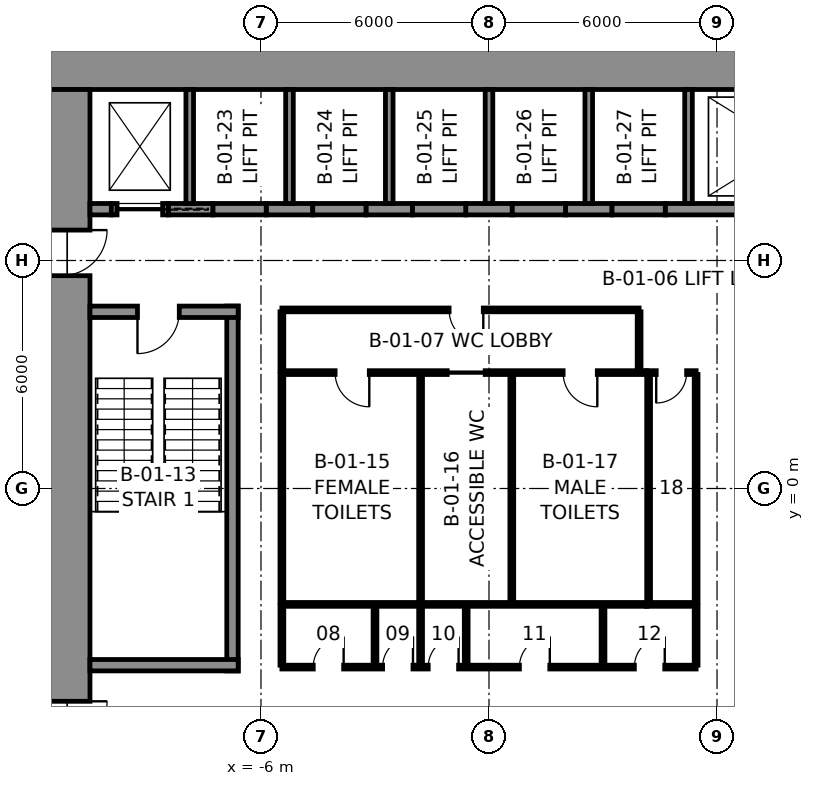
"""IFC4 building model, lengths in metres.
Left out: names, types, materials, properties, quantities, classifications, styles, units other than length and angle.
Written with IfcOpenShell. Run it as: python <this file> out.ifc"""

import sys

from ifc_helpers import new_model, si_unit, direction, frame, frame_2d, origin, place, context, subcontext, project, spatial, rectangle, extrude, element, fill, save


model = new_model("IFC4")
c1 = context("Model", 3, precision=1e-05, world=origin(), true_north=direction((0.0, 1.0)))
c2 = subcontext(c1, "Body", "Model", "MODEL_VIEW")
j1 = project(units=[si_unit("LENGTHUNIT", "METRE"), si_unit("PLANEANGLEUNIT", "RADIAN")], contexts=[c1])
p1 = place(None, origin())
s1 = spatial("IfcSite", under=j1, at=p1, CompositionType="ELEMENT")
p2 = place(p1, origin())
s2 = spatial("IfcBuilding", under=s1, at=p2, CompositionType="ELEMENT")
p3 = place(p2, frame((0.0, 0.0, -5.0)))
s3 = spatial("IfcBuildingStorey", under=s2, at=p3, CompositionType="ELEMENT", Elevation=-5.0)
p4 = place(p3, frame((-12.0, 11.25, -0.3), z_axis=(0.0, 0.0, 1.0), x_axis=(1.0, 0.0, 0.0)))
e1 = element("IfcWall", 1, at=p4, inside=s3, PredefinedType="SHEAR", context=c2, shape_type="SweptSolid", body=[
    extrude(rectangle(XDim=24.0, YDim=1.5, at=frame_2d((12.0, 0.0))), origin(), (0.0, 0.0, 1.0), 5.3),
])
p5 = place(p3, frame((-11.25, -10.5, -0.3), z_axis=(0.0, 0.0, 1.0), x_axis=(0.0, 1.0, 0.0)))
e2 = element("IfcWall", 2, at=p5, inside=s3, PredefinedType="SHEAR", context=c2, shape_type="SweptSolid", body=[
    extrude(rectangle(XDim=21.0, YDim=1.5, at=frame_2d((10.5, 0.0))), origin(), (0.0, 0.0, 1.0), 5.3),
])
p6 = place(p5, frame((16.1, 0.0, 0.3)))
e3 = element("IfcOpeningElement", 3, at=p6, cuts=e2, PredefinedType="OPENING", context=c2, shape_type="SweptSolid", body=[
    extrude(rectangle(XDim=1.2, YDim=2.3, at=frame_2d((0.6, 1.15))), frame((0.0, 0.76, 0.0), z_axis=(0.0, -1.0, 0.0), x_axis=(1.0, 0.0, 0.0)), (0.0, 0.0, 1.0), 1.52),
])
p7 = place(p5, frame((3.7, 0.0, 0.3)))
e4 = element("IfcOpeningElement", 4, at=p7, cuts=e2, PredefinedType="OPENING", context=c2, shape_type="SweptSolid", body=[
    extrude(rectangle(XDim=1.2, YDim=2.3, at=frame_2d((0.6, 1.15))), frame((0.0, 0.76, 0.0), z_axis=(0.0, -1.0, 0.0), x_axis=(1.0, 0.0, 0.0)), (0.0, 0.0, 1.0), 1.52),
])
p8 = place(p3, frame((-10.5, 7.35, -0.3), z_axis=(0.0, 0.0, 1.0), x_axis=(1.0, 0.0, 0.0)))
e5 = element("IfcWall", 5, at=p8, inside=s3, PredefinedType="SHEAR", context=c2, shape_type="SweptSolid", body=[
    extrude(rectangle(XDim=0.562, YDim=0.3, at=frame_2d((0.281, 0.0))), origin(), (0.0, 0.0, 1.0), 5.3),
])
p9 = place(p3, frame((-8.438, 7.35, -0.3), z_axis=(0.0, 0.0, 1.0), x_axis=(1.0, 0.0, 0.0)))
e6 = element("IfcWall", 6, at=p9, inside=s3, PredefinedType="SHEAR", context=c2, shape_type="SweptSolid", body=[
    extrude(rectangle(XDim=1.175, YDim=0.3, at=frame_2d((0.587, 0.0))), origin(), (0.0, 0.0, 1.0), 5.3),
])
for number, where, z_axis, x_axis in (
    (7, (-5.863, 7.35, -0.3), (0.0, 0.0, 1.0), (1.0, 0.0, 0.0)),
    (8, (-3.238, 7.35, -0.3), (0.0, 0.0, 1.0), (1.0, 0.0, 0.0)),
    (9, (-0.613, 7.35, -0.3), (0.0, 0.0, 1.0), (1.0, 0.0, 0.0)),
    (10, (2.012, 7.35, -0.3), (0.0, 0.0, 1.0), (1.0, 0.0, 0.0)),
):
    element("IfcWall", number, at=place(p3, frame(where, z_axis=z_axis, x_axis=x_axis)), inside=s3, PredefinedType="SHEAR", context=c2, shape_type="SweptSolid", body=[
        extrude(rectangle(XDim=1.225, YDim=0.3, at=frame_2d((0.613, 0.0))), origin(), (0.0, 0.0, 1.0), 5.3),
    ])
p10 = place(p3, frame((4.637, 7.35, -0.3), z_axis=(0.0, 0.0, 1.0), x_axis=(1.0, 0.0, 0.0)))
e11 = element("IfcWall", 11, at=p10, inside=s3, PredefinedType="SHEAR", context=c2, shape_type="SweptSolid", body=[
    extrude(rectangle(XDim=1.887, YDim=0.3, at=frame_2d((0.944, 0.0))), origin(), (0.0, 0.0, 1.0), 5.3),
])
p11 = place(p3, frame((-9.938, 7.35, -0.3), z_axis=(0.0, 0.0, 1.0), x_axis=(1.0, 0.0, 0.0)))
e12 = element("IfcWall", 12, at=p11, inside=s3, PredefinedType="PARTITIONING", context=c2, shape_type="SweptSolid", body=[
    extrude(rectangle(XDim=1.5, YDim=0.3, at=frame_2d((0.75, 0.0))), origin(), (0.0, 0.0, 1.0), 5.3),
])
p12 = place(p11, frame((0.15, 0.0, 0.3)))
e13 = element("IfcOpeningElement", 13, at=p12, cuts=e12, PredefinedType="OPENING", context=c2, shape_type="SweptSolid", body=[
    extrude(rectangle(XDim=1.2, YDim=2.3, at=frame_2d((0.6, 1.15))), frame((0.0, 0.16, 0.0), z_axis=(0.0, -1.0, 0.0), x_axis=(1.0, 0.0, 0.0)), (0.0, 0.0, 1.0), 0.32),
])
for number, where, z_axis, x_axis in (
    (14, (-7.262, 7.35, -0.3), (0.0, 0.0, 1.0), (1.0, 0.0, 0.0)),
    (15, (-4.637, 7.35, -0.3), (0.0, 0.0, 1.0), (1.0, 0.0, 0.0)),
    (16, (-2.012, 7.35, -0.3), (0.0, 0.0, 1.0), (1.0, 0.0, 0.0)),
    (17, (0.613, 7.35, -0.3), (0.0, 0.0, 1.0), (1.0, 0.0, 0.0)),
    (18, (3.238, 7.35, -0.3), (0.0, 0.0, 1.0), (1.0, 0.0, 0.0)),
):
    element("IfcWall", number, at=place(p3, frame(where, z_axis=z_axis, x_axis=x_axis)), inside=s3, PredefinedType="PARTITIONING", context=c2, shape_type="SweptSolid", body=[
        extrude(rectangle(XDim=1.4, YDim=0.3, at=frame_2d((0.7, 0.0))), origin(), (0.0, 0.0, 1.0), 5.3),
    ])
for number, where, z_axis, x_axis in (
    (19, (-7.875, 7.5, -0.3), (0.0, 0.0, 1.0), (0.0, 1.0, 0.0)),
    (20, (-5.25, 7.5, -0.3), (0.0, 0.0, 1.0), (0.0, 1.0, 0.0)),
    (21, (-2.625, 7.5, -0.3), (0.0, 0.0, 1.0), (0.0, 1.0, 0.0)),
    (22, (0.0, 7.5, -0.3), (0.0, 0.0, 1.0), (0.0, 1.0, 0.0)),
    (23, (2.625, 7.5, -0.3), (0.0, 0.0, 1.0), (0.0, 1.0, 0.0)),
    (24, (5.25, 7.5, -0.3), (0.0, 0.0, 1.0), (0.0, 1.0, 0.0)),
):
    element("IfcWall", number, at=place(p3, frame(where, z_axis=z_axis, x_axis=x_axis)), inside=s3, PredefinedType="PARTITIONING", context=c2, shape_type="SweptSolid", body=[
        extrude(rectangle(XDim=3.0, YDim=0.2, at=frame_2d((1.5, 0.0))), origin(), (0.0, 0.0, 1.0), 5.3),
    ])
p13 = place(p3, frame((-6.75, -4.8, 0.0), z_axis=(0.0, 0.0, 1.0), x_axis=(0.0, 1.0, 0.0)))
e25 = element("IfcWall", 25, at=p13, inside=s3, PredefinedType="SOLIDWALL", context=c2, shape_type="SweptSolid", body=[
    extrude(rectangle(XDim=9.6, YDim=0.3, at=frame_2d((4.8, 0.0))), origin(), (0.0, 0.0, 1.0), 4.75),
])
p14 = place(p3, frame((-10.5, 4.65, 0.0), z_axis=(0.0, 0.0, 1.0), x_axis=(1.0, 0.0, 0.0)))
e26 = element("IfcWall", 26, at=p14, inside=s3, PredefinedType="SOLIDWALL", context=c2, shape_type="SweptSolid", body=[
    extrude(rectangle(XDim=3.9, YDim=0.3, at=frame_2d((1.95, 0.0))), origin(), (0.0, 0.0, 1.0), 4.75),
])
p15 = place(p14, frame((1.25, 0.0, 0.0)))
e27 = element("IfcOpeningElement", 27, at=p15, cuts=e26, PredefinedType="OPENING", context=c2, shape_type="SweptSolid", body=[
    extrude(rectangle(XDim=1.1, YDim=2.3, at=frame_2d((0.55, 1.15))), frame((0.0, 0.16, 0.0), z_axis=(0.0, -1.0, 0.0), x_axis=(1.0, 0.0, 0.0)), (0.0, 0.0, 1.0), 0.32),
])
p16 = place(p3, frame((-6.6, -4.65, 0.0), z_axis=(0.0, 0.0, 1.0), x_axis=(-1.0, 0.0, 0.0)))
e28 = element("IfcWall", 28, at=p16, inside=s3, PredefinedType="SOLIDWALL", context=c2, shape_type="SweptSolid", body=[
    extrude(rectangle(XDim=3.9, YDim=0.3, at=frame_2d((1.95, 0.0))), origin(), (0.0, 0.0, 1.0), 4.75),
])
p17 = place(p3, frame((-5.45, 3.05, 0.0), z_axis=(0.0, 0.0, 1.0), x_axis=(1.0, 0.0, 0.0)))
e29 = element("IfcWall", 29, at=p17, inside=s3, PredefinedType="PARTITIONING", context=c2, shape_type="SweptSolid", body=[
    extrude(rectangle(XDim=9.6, YDim=0.1, at=frame_2d((4.8, 0.0))), origin(), (0.0, 0.0, 1.0), 4.75),
])
p18 = place(p17, frame((1.4, 0.0, 0.0)))
e30 = element("IfcOpeningElement", 30, at=p18, cuts=e29, PredefinedType="OPENING", context=c2, shape_type="SweptSolid", body=[
    extrude(rectangle(XDim=0.9, YDim=2.3, at=frame_2d((0.45, 1.15))), frame((0.0, 0.06, 0.0), z_axis=(0.0, -1.0, 0.0), x_axis=(1.0, 0.0, 0.0)), (0.0, 0.0, 1.0), 0.12),
])
p19 = place(p17, frame((4.35, 0.0, 0.0)))
e31 = element("IfcOpeningElement", 31, at=p19, cuts=e29, PredefinedType="OPENING", context=c2, shape_type="SweptSolid", body=[
    extrude(rectangle(XDim=1.0, YDim=2.3, at=frame_2d((0.5, 1.15))), frame((0.0, 0.06, 0.0), z_axis=(0.0, -1.0, 0.0), x_axis=(1.0, 0.0, 0.0)), (0.0, 0.0, 1.0), 0.12),
])
p20 = place(p17, frame((7.4, 0.0, 0.0)))
e32 = element("IfcOpeningElement", 32, at=p20, cuts=e29, PredefinedType="OPENING", context=c2, shape_type="SweptSolid", body=[
    extrude(rectangle(XDim=0.9, YDim=2.3, at=frame_2d((0.45, 1.15))), frame((0.0, 0.06, 0.0), z_axis=(0.0, -1.0, 0.0), x_axis=(1.0, 0.0, 0.0)), (0.0, 0.0, 1.0), 0.12),
])
p21 = place(p3, frame((4.15, 3.05, 0.0), z_axis=(0.0, 0.0, 1.0), x_axis=(1.0, 0.0, 0.0)))
e33 = element("IfcWall", 33, at=p21, inside=s3, PredefinedType="PARTITIONING", context=c2, shape_type="SweptSolid", body=[
    extrude(rectangle(XDim=1.3, YDim=0.1, at=frame_2d((0.65, 0.0))), origin(), (0.0, 0.0, 1.0), 4.75),
])
p22 = place(p21, frame((0.25, 0.0, 0.0)))
e34 = element("IfcOpeningElement", 34, at=p22, cuts=e33, PredefinedType="OPENING", context=c2, shape_type="SweptSolid", body=[
    extrude(rectangle(XDim=0.8, YDim=2.3, at=frame_2d((0.4, 1.15))), frame((0.0, 0.06, 0.0), z_axis=(0.0, -1.0, 0.0), x_axis=(1.0, 0.0, 0.0)), (0.0, 0.0, 1.0), 0.12),
])
p23 = place(p3, frame((4.15, -3.05, 0.0), z_axis=(0.0, 0.0, 1.0), x_axis=(-1.0, 0.0, 0.0)))
e35 = element("IfcWall", 35, at=p23, inside=s3, PredefinedType="PARTITIONING", context=c2, shape_type="SweptSolid", body=[
    extrude(rectangle(XDim=9.6, YDim=0.1, at=frame_2d((4.8, 0.0))), origin(), (0.0, 0.0, 1.0), 4.75),
])
p24 = place(p3, frame((5.45, -3.05, 0.0), z_axis=(0.0, 0.0, 1.0), x_axis=(-1.0, 0.0, 0.0)))
e36 = element("IfcWall", 36, at=p24, inside=s3, PredefinedType="PARTITIONING", context=c2, shape_type="SweptSolid", body=[
    extrude(rectangle(XDim=1.3, YDim=0.1, at=frame_2d((0.65, 0.0))), origin(), (0.0, 0.0, 1.0), 4.75),
])
for number, where, z_axis, x_axis in (
    (37, (5.45, 3.0, 0.0), (0.0, 0.0, 1.0), (0.0, -1.0, 0.0)),
    (38, (-5.45, -3.0, 0.0), (0.0, 0.0, 1.0), (0.0, 1.0, 0.0)),
    (39, (-1.8, -3.0, 0.0), (0.0, 0.0, 1.0), (0.0, 1.0, 0.0)),
    (40, (0.6, -3.0, 0.0), (0.0, 0.0, 1.0), (0.0, 1.0, 0.0)),
    (41, (4.2, -3.0, 0.0), (0.0, 0.0, 1.0), (0.0, 1.0, 0.0)),
):
    element("IfcWall", number, at=place(p3, frame(where, z_axis=z_axis, x_axis=x_axis)), inside=s3, PredefinedType="PARTITIONING", context=c2, shape_type="SweptSolid", body=[
        extrude(rectangle(XDim=6.0, YDim=0.1, at=frame_2d((3.0, 0.0))), origin(), (0.0, 0.0, 1.0), 4.75),
    ])
p25 = place(p3, frame((-5.45, 4.7, 0.0), z_axis=(0.0, 0.0, 1.0), x_axis=(1.0, 0.0, 0.0)))
e42 = element("IfcWall", 42, at=p25, inside=s3, PredefinedType="PARTITIONING", context=c2, shape_type="SweptSolid", body=[
    extrude(rectangle(XDim=9.4, YDim=0.1, at=frame_2d((4.7, 0.0))), origin(), (0.0, 0.0, 1.0), 4.75),
])
p26 = place(p25, frame((4.4, 0.0, 0.0)))
e43 = element("IfcOpeningElement", 43, at=p26, cuts=e42, PredefinedType="OPENING", context=c2, shape_type="SweptSolid", body=[
    extrude(rectangle(XDim=0.9, YDim=2.3, at=frame_2d((0.45, 1.15))), frame((0.0, 0.06, 0.0), z_axis=(0.0, -1.0, 0.0), x_axis=(1.0, 0.0, 0.0)), (0.0, 0.0, 1.0), 0.12),
])
for number, where, z_axis, x_axis in (
    (44, (-5.45, 3.1, 0.0), (0.0, 0.0, 1.0), (0.0, 1.0, 0.0)),
    (45, (3.95, 3.1, 0.0), (0.0, 0.0, 1.0), (0.0, 1.0, 0.0)),
):
    element("IfcWall", number, at=place(p3, frame(where, z_axis=z_axis, x_axis=x_axis)), inside=s3, PredefinedType="PARTITIONING", context=c2, shape_type="SweptSolid", body=[
        extrude(rectangle(XDim=1.55, YDim=0.1, at=frame_2d((0.775, 0.0))), origin(), (0.0, 0.0, 1.0), 4.75),
    ])
p27 = place(p3, frame((5.45, -4.7, 0.0), z_axis=(0.0, 0.0, 1.0), x_axis=(-1.0, 0.0, 0.0)))
e46 = element("IfcWall", 46, at=p27, inside=s3, PredefinedType="PARTITIONING", context=c2, shape_type="SweptSolid", body=[
    extrude(rectangle(XDim=10.9, YDim=0.1, at=frame_2d((5.45, 0.0))), origin(), (0.0, 0.0, 1.0), 4.75),
])
p28 = place(p27, frame((9.275, 0.0, 0.0)))
e47 = element("IfcOpeningElement", 47, at=p28, cuts=e46, PredefinedType="OPENING", context=c2, shape_type="SweptSolid", body=[
    extrude(rectangle(XDim=0.8, YDim=2.3, at=frame_2d((0.4, 1.15))), frame((0.0, 0.06, 0.0), z_axis=(0.0, -1.0, 0.0), x_axis=(1.0, 0.0, 0.0)), (0.0, 0.0, 1.0), 0.12),
])
p29 = place(p27, frame((7.45, 0.0, 0.0)))
e48 = element("IfcOpeningElement", 48, at=p29, cuts=e46, PredefinedType="OPENING", context=c2, shape_type="SweptSolid", body=[
    extrude(rectangle(XDim=0.8, YDim=2.3, at=frame_2d((0.4, 1.15))), frame((0.0, 0.06, 0.0), z_axis=(0.0, -1.0, 0.0), x_axis=(1.0, 0.0, 0.0)), (0.0, 0.0, 1.0), 0.12),
])
p30 = place(p27, frame((6.25, 0.0, 0.0)))
e49 = element("IfcOpeningElement", 49, at=p30, cuts=e46, PredefinedType="OPENING", context=c2, shape_type="SweptSolid", body=[
    extrude(rectangle(XDim=0.8, YDim=2.3, at=frame_2d((0.4, 1.15))), frame((0.0, 0.06, 0.0), z_axis=(0.0, -1.0, 0.0), x_axis=(1.0, 0.0, 0.0)), (0.0, 0.0, 1.0), 0.12),
])
p31 = place(p27, frame((3.85, 0.0, 0.0)))
e50 = element("IfcOpeningElement", 50, at=p31, cuts=e46, PredefinedType="OPENING", context=c2, shape_type="SweptSolid", body=[
    extrude(rectangle(XDim=0.8, YDim=2.3, at=frame_2d((0.4, 1.15))), frame((0.0, 0.06, 0.0), z_axis=(0.0, -1.0, 0.0), x_axis=(1.0, 0.0, 0.0)), (0.0, 0.0, 1.0), 0.12),
])
p32 = place(p27, frame((0.825, 0.0, 0.0)))
e51 = element("IfcOpeningElement", 51, at=p32, cuts=e46, PredefinedType="OPENING", context=c2, shape_type="SweptSolid", body=[
    extrude(rectangle(XDim=0.8, YDim=2.3, at=frame_2d((0.4, 1.15))), frame((0.0, 0.06, 0.0), z_axis=(0.0, -1.0, 0.0), x_axis=(1.0, 0.0, 0.0)), (0.0, 0.0, 1.0), 0.12),
])
for number, where, z_axis, x_axis in (
    (52, (-5.45, -3.1, 0.0), (0.0, 0.0, 1.0), (0.0, -1.0, 0.0)),
    (53, (5.45, -3.1, 0.0), (0.0, 0.0, 1.0), (0.0, -1.0, 0.0)),
    (54, (-3.0, -3.1, 0.0), (0.0, 0.0, 1.0), (0.0, -1.0, 0.0)),
    (55, (-1.8, -3.1, 0.0), (0.0, 0.0, 1.0), (0.0, -1.0, 0.0)),
    (56, (-0.6, -3.1, 0.0), (0.0, 0.0, 1.0), (0.0, -1.0, 0.0)),
    (57, (3.0, -3.1, 0.0), (0.0, 0.0, 1.0), (0.0, -1.0, 0.0)),
):
    element("IfcWall", number, at=place(p3, frame(where, z_axis=z_axis, x_axis=x_axis)), inside=s3, PredefinedType="PARTITIONING", context=c2, shape_type="SweptSolid", body=[
        extrude(rectangle(XDim=1.55, YDim=0.1, at=frame_2d((0.775, 0.0))), origin(), (0.0, 0.0, 1.0), 4.75),
    ])
p33 = place(p15, frame((1.1, 0.0, 0.0), z_axis=(0.0, 0.0, 1.0), x_axis=(-1.0, 0.0, 0.0)))
e58 = element("IfcDoor", 58, at=p33, inside=s3, OperationType="SINGLE_SWING_RIGHT", PredefinedType="DOOR", context=c2, shape_type="SweptSolid", body=[
    extrude(rectangle(XDim=1.1, YDim=2.3, at=frame_2d((0.55, 1.15))), frame((0.0, 0.025, 0.0), z_axis=(0.0, -1.0, 0.0), x_axis=(1.0, 0.0, 0.0)), (0.0, 0.0, 1.0), 0.05),
])
fill(e27, e58)
p34 = place(p18, frame((0.9, 0.0, 0.0), z_axis=(0.0, 0.0, 1.0), x_axis=(-1.0, 0.0, 0.0)))
e59 = element("IfcDoor", 59, at=p34, inside=s3, OperationType="SINGLE_SWING_LEFT", PredefinedType="DOOR", context=c2, shape_type="SweptSolid", body=[
    extrude(rectangle(XDim=0.9, YDim=2.3, at=frame_2d((0.45, 1.15))), frame((0.0, 0.025, 0.0), z_axis=(0.0, -1.0, 0.0), x_axis=(1.0, 0.0, 0.0)), (0.0, 0.0, 1.0), 0.05),
])
fill(e30, e59)
p35 = place(p19, frame((1.0, 0.0, 0.0), z_axis=(0.0, 0.0, 1.0), x_axis=(-1.0, 0.0, 0.0)))
e60 = element("IfcDoor", 60, at=p35, inside=s3, OperationType="SLIDING_TO_LEFT", PredefinedType="DOOR", context=c2, shape_type="SweptSolid", body=[
    extrude(rectangle(XDim=1.0, YDim=2.3, at=frame_2d((0.5, 1.15))), frame((0.0, 0.025, 0.0), z_axis=(0.0, -1.0, 0.0), x_axis=(1.0, 0.0, 0.0)), (0.0, 0.0, 1.0), 0.05),
])
fill(e31, e60)
p36 = place(p20, frame((0.9, 0.0, 0.0), z_axis=(0.0, 0.0, 1.0), x_axis=(-1.0, 0.0, 0.0)))
e61 = element("IfcDoor", 61, at=p36, inside=s3, OperationType="SINGLE_SWING_LEFT", PredefinedType="DOOR", context=c2, shape_type="SweptSolid", body=[
    extrude(rectangle(XDim=0.9, YDim=2.3, at=frame_2d((0.45, 1.15))), frame((0.0, 0.025, 0.0), z_axis=(0.0, -1.0, 0.0), x_axis=(1.0, 0.0, 0.0)), (0.0, 0.0, 1.0), 0.05),
])
fill(e32, e61)
p37 = place(p22, frame((0.8, 0.0, 0.0), z_axis=(0.0, 0.0, 1.0), x_axis=(-1.0, 0.0, 0.0)))
e62 = element("IfcDoor", 62, at=p37, inside=s3, OperationType="SINGLE_SWING_RIGHT", PredefinedType="DOOR", context=c2, shape_type="SweptSolid", body=[
    extrude(rectangle(XDim=0.8, YDim=2.3, at=frame_2d((0.4, 1.15))), frame((0.0, 0.025, 0.0), z_axis=(0.0, -1.0, 0.0), x_axis=(1.0, 0.0, 0.0)), (0.0, 0.0, 1.0), 0.05),
])
fill(e34, e62)
p38 = place(p26, frame((0.9, 0.0, 0.0), z_axis=(0.0, 0.0, 1.0), x_axis=(-1.0, 0.0, 0.0)))
e63 = element("IfcDoor", 63, at=p38, inside=s3, OperationType="SINGLE_SWING_LEFT", PredefinedType="DOOR", context=c2, shape_type="SweptSolid", body=[
    extrude(rectangle(XDim=0.9, YDim=2.3, at=frame_2d((0.45, 1.15))), frame((0.0, 0.025, 0.0), z_axis=(0.0, -1.0, 0.0), x_axis=(1.0, 0.0, 0.0)), (0.0, 0.0, 1.0), 0.05),
])
fill(e43, e63)
p39 = place(p28, frame((0.8, 0.0, 0.0), z_axis=(0.0, 0.0, 1.0), x_axis=(-1.0, 0.0, 0.0)))
e64 = element("IfcDoor", 64, at=p39, inside=s3, OperationType="SINGLE_SWING_RIGHT", PredefinedType="DOOR", context=c2, shape_type="SweptSolid", body=[
    extrude(rectangle(XDim=0.8, YDim=2.3, at=frame_2d((0.4, 1.15))), frame((0.0, 0.025, 0.0), z_axis=(0.0, -1.0, 0.0), x_axis=(1.0, 0.0, 0.0)), (0.0, 0.0, 1.0), 0.05),
])
fill(e47, e64)
p40 = place(p29, frame((0.8, 0.0, 0.0), z_axis=(0.0, 0.0, 1.0), x_axis=(-1.0, 0.0, 0.0)))
e65 = element("IfcDoor", 65, at=p40, inside=s3, OperationType="SINGLE_SWING_RIGHT", PredefinedType="DOOR", context=c2, shape_type="SweptSolid", body=[
    extrude(rectangle(XDim=0.8, YDim=2.3, at=frame_2d((0.4, 1.15))), frame((0.0, 0.025, 0.0), z_axis=(0.0, -1.0, 0.0), x_axis=(1.0, 0.0, 0.0)), (0.0, 0.0, 1.0), 0.05),
])
fill(e48, e65)
p41 = place(p30, frame((0.8, 0.0, 0.0), z_axis=(0.0, 0.0, 1.0), x_axis=(-1.0, 0.0, 0.0)))
e66 = element("IfcDoor", 66, at=p41, inside=s3, OperationType="SINGLE_SWING_RIGHT", PredefinedType="DOOR", context=c2, shape_type="SweptSolid", body=[
    extrude(rectangle(XDim=0.8, YDim=2.3, at=frame_2d((0.4, 1.15))), frame((0.0, 0.025, 0.0), z_axis=(0.0, -1.0, 0.0), x_axis=(1.0, 0.0, 0.0)), (0.0, 0.0, 1.0), 0.05),
])
fill(e49, e66)
p42 = place(p31, frame((0.8, 0.0, 0.0), z_axis=(0.0, 0.0, 1.0), x_axis=(-1.0, 0.0, 0.0)))
e67 = element("IfcDoor", 67, at=p42, inside=s3, OperationType="SINGLE_SWING_RIGHT", PredefinedType="DOOR", context=c2, shape_type="SweptSolid", body=[
    extrude(rectangle(XDim=0.8, YDim=2.3, at=frame_2d((0.4, 1.15))), frame((0.0, 0.025, 0.0), z_axis=(0.0, -1.0, 0.0), x_axis=(1.0, 0.0, 0.0)), (0.0, 0.0, 1.0), 0.05),
])
fill(e50, e67)
p43 = place(p32, frame((0.8, 0.0, 0.0), z_axis=(0.0, 0.0, 1.0), x_axis=(-1.0, 0.0, 0.0)))
e68 = element("IfcDoor", 68, at=p43, inside=s3, OperationType="SINGLE_SWING_RIGHT", PredefinedType="DOOR", context=c2, shape_type="SweptSolid", body=[
    extrude(rectangle(XDim=0.8, YDim=2.3, at=frame_2d((0.4, 1.15))), frame((0.0, 0.025, 0.0), z_axis=(0.0, -1.0, 0.0), x_axis=(1.0, 0.0, 0.0)), (0.0, 0.0, 1.0), 0.05),
])
fill(e51, e68)
p44 = place(p6, frame((1.2, 0.0, 0.0), z_axis=(0.0, 0.0, 1.0), x_axis=(-1.0, 0.0, 0.0)))
e69 = element("IfcDoor", 69, at=p44, inside=s3, OperationType="SINGLE_SWING_LEFT", PredefinedType="DOOR", context=c2, shape_type="SweptSolid", body=[
    extrude(rectangle(XDim=1.2, YDim=2.3, at=frame_2d((0.6, 1.15))), frame((0.0, 0.025, 0.0), z_axis=(0.0, -1.0, 0.0), x_axis=(1.0, 0.0, 0.0)), (0.0, 0.0, 1.0), 0.05),
])
fill(e3, e69)
p45 = place(p7, frame((1.2, 0.0, 0.0), z_axis=(0.0, 0.0, 1.0), x_axis=(-1.0, 0.0, 0.0)))
e70 = element("IfcDoor", 70, at=p45, inside=s3, OperationType="SINGLE_SWING_LEFT", PredefinedType="DOOR", context=c2, shape_type="SweptSolid", body=[
    extrude(rectangle(XDim=1.2, YDim=2.3, at=frame_2d((0.6, 1.15))), frame((0.0, 0.025, 0.0), z_axis=(0.0, -1.0, 0.0), x_axis=(1.0, 0.0, 0.0)), (0.0, 0.0, 1.0), 0.05),
])
fill(e4, e70)
p46 = place(p12, frame((1.2, 0.0, 0.0), z_axis=(0.0, 0.0, 1.0), x_axis=(-1.0, 0.0, 0.0)))
e71 = element("IfcDoor", 71, at=p46, inside=s3, OperationType="SLIDING_TO_LEFT", PredefinedType="DOOR", context=c2, shape_type="SweptSolid", body=[
    extrude(rectangle(XDim=1.2, YDim=2.3, at=frame_2d((0.6, 1.15))), frame((0.0, 0.025, 0.0), z_axis=(0.0, -1.0, 0.0), x_axis=(1.0, 0.0, 0.0)), (0.0, 0.0, 1.0), 0.05),
])
fill(e13, e71)
save(model, sys.argv[1])
